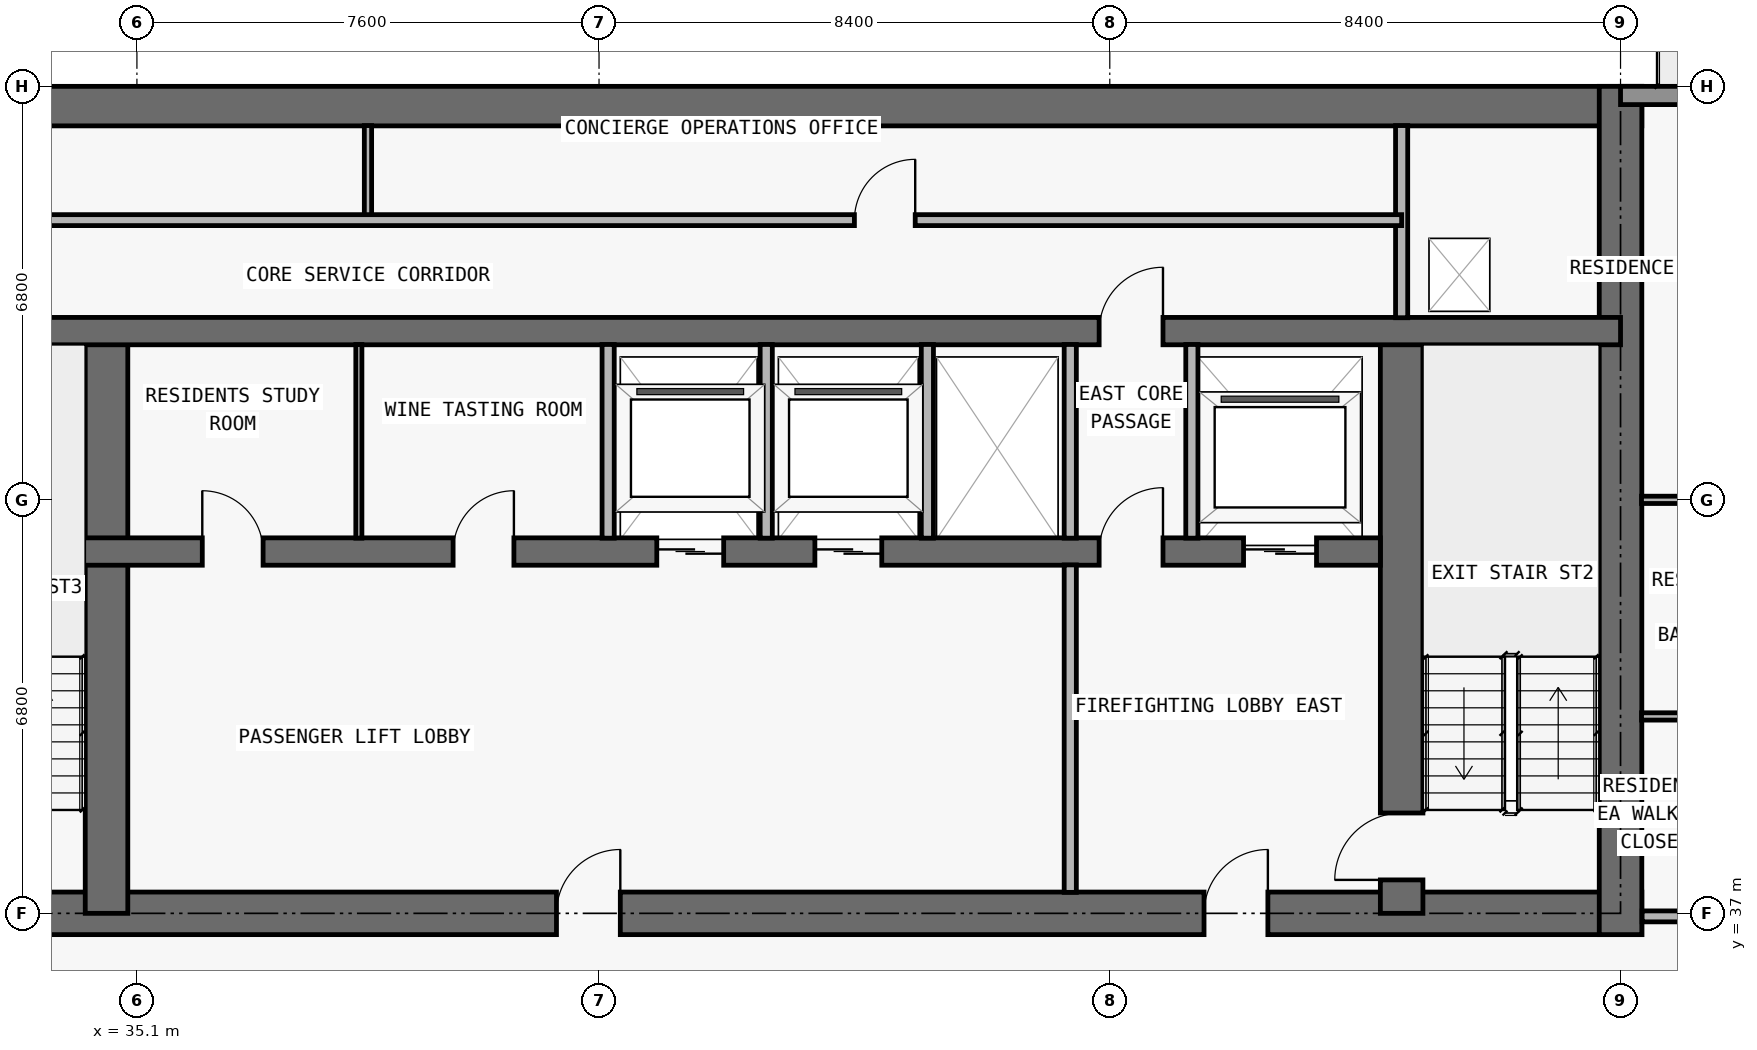
"""IFC4 building model, lengths in metres.
Left out: names, types, materials, properties, quantities, classifications, styles, units other than length and angle.
Written with IfcOpenShell. Run it as: python <this file> out.ifc"""

import sys

from ifc_helpers import new_model, si_unit, direction, frame, frame_2d, origin, place, context, subcontext, project, spatial, rectangle, extrude, element, fill, save


model = new_model("IFC4")
c1 = context("Model", 3, precision=1e-05, world=origin(), true_north=direction((0.0, 1.0)))
c2 = subcontext(c1, "Body", "Model", "MODEL_VIEW")
j1 = project(units=[si_unit("LENGTHUNIT", "METRE"), si_unit("PLANEANGLEUNIT", "RADIAN")], contexts=[c1])
p1 = place(None, origin())
s1 = spatial("IfcSite", under=j1, at=p1, CompositionType="ELEMENT")
p2 = place(p1, origin())
s2 = spatial("IfcBuilding", under=s1, at=p2, CompositionType="ELEMENT")
p3 = place(p2, frame((0.0, 0.0, 177.0)))
s3 = spatial("IfcBuildingStorey", under=s2, at=p3, CompositionType="ELEMENT", Elevation=177.0)
p4 = place(p3, frame((17.95, 37.0, 0.0), z_axis=(0.0, 0.0, 1.0), x_axis=(1.0, 0.0, 0.0)))
e1 = element("IfcWall", 1, at=p4, inside=s3, PredefinedType="SHEAR", context=c2, shape_type="SweptSolid", body=[
    extrude(rectangle(XDim=41.9, YDim=0.7, at=frame_2d((20.95, 0.0))), origin(), (0.0, 0.0, 1.0), 3.05),
])
p5 = place(p4, frame((14.35, 0.0, 0.0)))
e2 = element("IfcOpeningElement", 2, at=p5, cuts=e1, PredefinedType="OPENING", context=c2, shape_type="SweptSolid", body=[
    extrude(rectangle(XDim=1.1, YDim=2.15, at=frame_2d((0.55, 1.075))), frame((0.0, 0.36, 0.0), z_axis=(0.0, -1.0, 0.0), x_axis=(1.0, 0.0, 0.0)), (0.0, 0.0, 1.0), 0.72),
])
p6 = place(p4, frame((6.2, 0.0, 0.0)))
e3 = element("IfcOpeningElement", 3, at=p6, cuts=e1, PredefinedType="OPENING", context=c2, shape_type="SweptSolid", body=[
    extrude(rectangle(XDim=1.05, YDim=2.15, at=frame_2d((0.525, 1.075))), frame((0.0, 0.36, 0.0), z_axis=(0.0, -1.0, 0.0), x_axis=(1.0, 0.0, 0.0)), (0.0, 0.0, 1.0), 0.72),
])
p7 = place(p4, frame((34.7, 0.0, 0.0)))
e4 = element("IfcOpeningElement", 4, at=p7, cuts=e1, PredefinedType="OPENING", context=c2, shape_type="SweptSolid", body=[
    extrude(rectangle(XDim=1.05, YDim=2.15, at=frame_2d((0.525, 1.075))), frame((0.0, 0.36, 0.0), z_axis=(0.0, -1.0, 0.0), x_axis=(1.0, 0.0, 0.0)), (0.0, 0.0, 1.0), 0.72),
])
p8 = place(p4, frame((10.812, 0.0, 0.0)))
e5 = element("IfcOpeningElement", 5, at=p8, cuts=e1, PredefinedType="OPENING", context=c2, shape_type="SweptSolid", body=[
    extrude(rectangle(XDim=1.05, YDim=2.15, at=frame_2d((0.525, 1.075))), frame((0.0, 0.36, 0.0), z_axis=(0.0, -1.0, 0.0), x_axis=(1.0, 0.0, 0.0)), (0.0, 0.0, 1.0), 0.72),
])
p9 = place(p4, frame((24.05, 0.0, 0.0)))
e6 = element("IfcOpeningElement", 6, at=p9, cuts=e1, PredefinedType="OPENING", context=c2, shape_type="SweptSolid", body=[
    extrude(rectangle(XDim=1.05, YDim=2.15, at=frame_2d((0.525, 1.075))), frame((0.0, 0.36, 0.0), z_axis=(0.0, -1.0, 0.0), x_axis=(1.0, 0.0, 0.0)), (0.0, 0.0, 1.0), 0.72),
])
p10 = place(p3, frame((17.95, 50.275, 0.0), z_axis=(0.0, 0.0, 1.0), x_axis=(1.0, 0.0, 0.0)))
e7 = element("IfcWall", 7, at=p10, inside=s3, PredefinedType="SHEAR", context=c2, shape_type="SweptSolid", body=[
    extrude(rectangle(XDim=41.9, YDim=0.65, at=frame_2d((20.95, 0.0))), origin(), (0.0, 0.0, 1.0), 3.05),
])
p11 = place(p3, frame((59.5, 36.65, 0.0), z_axis=(0.0, 0.0, 1.0), x_axis=(0.0, 1.0, 0.0)))
e8 = element("IfcWall", 8, at=p11, inside=s3, PredefinedType="SHEAR", context=c2, shape_type="SweptSolid", body=[
    extrude(rectangle(XDim=13.95, YDim=0.7, at=frame_2d((6.975, 0.0))), origin(), (0.0, 0.0, 1.0), 3.05),
])
p12 = place(p3, frame((55.9, 37.0, 0.0), z_axis=(0.0, 0.0, 1.0), x_axis=(0.0, 1.0, 0.0)))
e9 = element("IfcWall", 9, at=p12, inside=s3, PredefinedType="SHEAR", context=c2, shape_type="SweptSolid", body=[
    extrude(rectangle(XDim=9.575, YDim=0.7, at=frame_2d((4.788, 0.0))), origin(), (0.0, 0.0, 1.0), 3.05),
])
p13 = place(p12, frame((0.55, 0.0, 0.0)))
e10 = element("IfcOpeningElement", 10, at=p13, cuts=e9, PredefinedType="OPENING", context=c2, shape_type="SweptSolid", body=[
    extrude(rectangle(XDim=1.1, YDim=2.15, at=frame_2d((0.55, 1.075))), frame((0.0, 0.36, 0.0), z_axis=(0.0, -1.0, 0.0), x_axis=(1.0, 0.0, 0.0)), (0.0, 0.0, 1.0), 0.72),
])
p14 = place(p3, frame((34.6, 37.0, 0.0), z_axis=(0.0, 0.0, 1.0), x_axis=(0.0, 1.0, 0.0)))
e11 = element("IfcWall", 11, at=p14, inside=s3, PredefinedType="SHEAR", context=c2, shape_type="SweptSolid", body=[
    extrude(rectangle(XDim=9.575, YDim=0.7, at=frame_2d((4.788, 0.0))), origin(), (0.0, 0.0, 1.0), 3.05),
])
p15 = place(p3, frame((22.25, 42.95, 0.0), z_axis=(0.0, 0.0, 1.0), x_axis=(1.0, 0.0, 0.0)))
e12 = element("IfcWall", 12, at=p15, inside=s3, PredefinedType="SHEAR", context=c2, shape_type="SweptSolid", body=[
    extrude(rectangle(XDim=33.3, YDim=0.45, at=frame_2d((16.65, 0.0))), origin(), (0.0, 0.0, 1.0), 3.05),
])
p16 = place(p15, frame((1.05, 0.0, 0.0)))
e13 = element("IfcOpeningElement", 13, at=p16, cuts=e12, PredefinedType="OPENING", context=c2, shape_type="SweptSolid", body=[
    extrude(rectangle(XDim=1.2, YDim=2.2, at=frame_2d((0.6, 1.1))), frame((0.0, 0.235, 0.0), z_axis=(0.0, -1.0, 0.0), x_axis=(1.0, 0.0, 0.0)), (0.0, 0.0, 1.0), 0.47),
])
p17 = place(p15, frame((31.05, 0.0, 0.0)))
e14 = element("IfcOpeningElement", 14, at=p17, cuts=e12, PredefinedType="OPENING", context=c2, shape_type="SweptSolid", body=[
    extrude(rectangle(XDim=1.2, YDim=2.2, at=frame_2d((0.6, 1.1))), frame((0.0, 0.235, 0.0), z_axis=(0.0, -1.0, 0.0), x_axis=(1.0, 0.0, 0.0)), (0.0, 0.0, 1.0), 0.47),
])
p18 = place(p15, frame((21.4, 0.0, 0.0)))
e15 = element("IfcOpeningElement", 15, at=p18, cuts=e12, PredefinedType="OPENING", context=c2, shape_type="SweptSolid", body=[
    extrude(rectangle(XDim=1.1, YDim=2.2, at=frame_2d((0.55, 1.1))), frame((0.0, 0.235, 0.0), z_axis=(0.0, -1.0, 0.0), x_axis=(1.0, 0.0, 0.0)), (0.0, 0.0, 1.0), 0.47),
])
p19 = place(p15, frame((24.0, 0.0, 0.0)))
e16 = element("IfcOpeningElement", 16, at=p19, cuts=e12, PredefinedType="OPENING", context=c2, shape_type="SweptSolid", body=[
    extrude(rectangle(XDim=1.1, YDim=2.2, at=frame_2d((0.55, 1.1))), frame((0.0, 0.235, 0.0), z_axis=(0.0, -1.0, 0.0), x_axis=(1.0, 0.0, 0.0)), (0.0, 0.0, 1.0), 0.47),
])
p20 = place(p15, frame((3.625, 0.0, 0.0)))
e17 = element("IfcOpeningElement", 17, at=p20, cuts=e12, PredefinedType="OPENING", context=c2, shape_type="SweptSolid", body=[
    extrude(rectangle(XDim=1.05, YDim=2.15, at=frame_2d((0.525, 1.075))), frame((0.0, 0.235, 0.0), z_axis=(0.0, -1.0, 0.0), x_axis=(1.0, 0.0, 0.0)), (0.0, 0.0, 1.0), 0.47),
])
p21 = place(p15, frame((28.675, 0.0, 0.0)))
e18 = element("IfcOpeningElement", 18, at=p21, cuts=e12, PredefinedType="OPENING", context=c2, shape_type="SweptSolid", body=[
    extrude(rectangle(XDim=1.05, YDim=2.15, at=frame_2d((0.525, 1.075))), frame((0.0, 0.235, 0.0), z_axis=(0.0, -1.0, 0.0), x_axis=(1.0, 0.0, 0.0)), (0.0, 0.0, 1.0), 0.47),
])
p22 = place(p15, frame((13.925, 0.0, 0.0)))
e19 = element("IfcOpeningElement", 19, at=p22, cuts=e12, PredefinedType="OPENING", context=c2, shape_type="SweptSolid", body=[
    extrude(rectangle(XDim=1.0, YDim=2.2, at=frame_2d((0.5, 1.1))), frame((0.0, 0.235, 0.0), z_axis=(0.0, -1.0, 0.0), x_axis=(1.0, 0.0, 0.0)), (0.0, 0.0, 1.0), 0.47),
])
p23 = place(p15, frame((18.05, 0.0, 0.0)))
e20 = element("IfcOpeningElement", 20, at=p23, cuts=e12, PredefinedType="OPENING", context=c2, shape_type="SweptSolid", body=[
    extrude(rectangle(XDim=1.0, YDim=2.2, at=frame_2d((0.5, 1.1))), frame((0.0, 0.235, 0.0), z_axis=(0.0, -1.0, 0.0), x_axis=(1.0, 0.0, 0.0)), (0.0, 0.0, 1.0), 0.47),
])
p24 = place(p3, frame((18.3, 46.575, 0.0), z_axis=(0.0, 0.0, 1.0), x_axis=(1.0, 0.0, 0.0)))
e21 = element("IfcWall", 21, at=p24, inside=s3, PredefinedType="SHEAR", context=c2, shape_type="SweptSolid", body=[
    extrude(rectangle(XDim=41.2, YDim=0.45, at=frame_2d((20.6, 0.0))), origin(), (0.0, 0.0, 1.0), 3.05),
])
p25 = place(p24, frame((7.575, 0.0, 0.0)))
e22 = element("IfcOpeningElement", 22, at=p25, cuts=e21, PredefinedType="OPENING", context=c2, shape_type="SweptSolid", body=[
    extrude(rectangle(XDim=1.05, YDim=2.15, at=frame_2d((0.525, 1.075))), frame((0.0, 0.235, 0.0), z_axis=(0.0, -1.0, 0.0), x_axis=(1.0, 0.0, 0.0)), (0.0, 0.0, 1.0), 0.47),
])
p26 = place(p24, frame((32.625, 0.0, 0.0)))
e23 = element("IfcOpeningElement", 23, at=p26, cuts=e21, PredefinedType="OPENING", context=c2, shape_type="SweptSolid", body=[
    extrude(rectangle(XDim=1.05, YDim=2.15, at=frame_2d((0.525, 1.075))), frame((0.0, 0.235, 0.0), z_axis=(0.0, -1.0, 0.0), x_axis=(1.0, 0.0, 0.0)), (0.0, 0.0, 1.0), 0.47),
])
p27 = place(p3, frame((59.5, 50.45, 0.0), z_axis=(0.0, 0.0, 1.0), x_axis=(1.0, 0.0, 0.0)))
e24 = element("IfcWall", 24, at=p27, inside=s3, PredefinedType="STANDARD", context=c2, shape_type="SweptSolid", body=[
    extrude(rectangle(XDim=8.2, YDim=0.3, at=frame_2d((4.1, 0.0))), origin(), (0.0, 0.0, 1.0), 3.05),
])
p28 = place(p27, frame((3.1, 0.0, 0.0)))
e25 = element("IfcOpeningElement", 25, at=p28, cuts=e24, PredefinedType="OPENING", context=c2, shape_type="SweptSolid", body=[
    extrude(rectangle(XDim=2.0, YDim=2.3, at=frame_2d((1.0, 1.15))), frame((0.0, 0.16, 0.0), z_axis=(0.0, -1.0, 0.0), x_axis=(1.0, 0.0, 0.0)), (0.0, 0.0, 1.0), 0.32),
])
p29 = place(p3, frame((38.75, 43.17, 0.0), z_axis=(0.0, 0.0, 1.0), x_axis=(0.0, 1.0, 0.0)))
e26 = element("IfcWall", 26, at=p29, inside=s3, PredefinedType="MOVABLE", context=c2, shape_type="SweptSolid", body=[
    extrude(rectangle(XDim=3.185, YDim=0.1, at=frame_2d((1.593, 0.0))), origin(), (0.0, 0.0, 1.0), 3.05),
])
p30 = place(p3, frame((38.9, 48.4, 0.0), z_axis=(0.0, 0.0, 1.0), x_axis=(0.0, 1.0, 0.0)))
e27 = element("IfcWall", 27, at=p30, inside=s3, PredefinedType="PARTITIONING", context=c2, shape_type="SweptSolid", body=[
    extrude(rectangle(XDim=1.555, YDim=0.12, at=frame_2d((0.778, 0.0))), origin(), (0.0, 0.0, 1.0), 3.05),
])
for number, where, z_axis, x_axis in (
    (28, (42.85, 43.17, 0.0), (0.0, 0.0, 1.0), (0.0, 1.0, 0.0)),
    (29, (45.45, 43.17, 0.0), (0.0, 0.0, 1.0), (0.0, 1.0, 0.0)),
    (30, (48.1, 43.17, 0.0), (0.0, 0.0, 1.0), (0.0, 1.0, 0.0)),
):
    element("IfcWall", number, at=place(p3, frame(where, z_axis=z_axis, x_axis=x_axis)), inside=s3, PredefinedType="PARTITIONING", context=c2, shape_type="SweptSolid", body=[
        extrude(rectangle(XDim=3.185, YDim=0.2, at=frame_2d((1.593, 0.0))), origin(), (0.0, 0.0, 1.0), 3.05),
    ])
p31 = place(p3, frame((50.45, 37.345, 0.0), z_axis=(0.0, 0.0, 1.0), x_axis=(0.0, 1.0, 0.0)))
e31 = element("IfcWall", 31, at=p31, inside=s3, PredefinedType="PARTITIONING", context=c2, shape_type="SweptSolid", body=[
    extrude(rectangle(XDim=5.385, YDim=0.2, at=frame_2d((2.692, 0.0))), origin(), (0.0, 0.0, 1.0), 3.05),
])
for number, where, z_axis, x_axis in (
    (32, (50.45, 43.17, 0.0), (0.0, 0.0, 1.0), (0.0, 1.0, 0.0)),
    (33, (52.45, 43.17, 0.0), (0.0, 0.0, 1.0), (0.0, 1.0, 0.0)),
):
    element("IfcWall", number, at=place(p3, frame(where, z_axis=z_axis, x_axis=x_axis)), inside=s3, PredefinedType="PARTITIONING", context=c2, shape_type="SweptSolid", body=[
        extrude(rectangle(XDim=3.185, YDim=0.2, at=frame_2d((1.593, 0.0))), origin(), (0.0, 0.0, 1.0), 3.05),
    ])
p32 = place(p3, frame((55.9, 46.795, 0.0), z_axis=(0.0, 0.0, 1.0), x_axis=(0.0, 1.0, 0.0)))
e34 = element("IfcWall", 34, at=p32, inside=s3, PredefinedType="PARTITIONING", context=c2, shape_type="SweptSolid", body=[
    extrude(rectangle(XDim=3.16, YDim=0.2, at=frame_2d((1.58, 0.0))), origin(), (0.0, 0.0, 1.0), 3.05),
])
p33 = place(p3, frame((59.855, 36.95, 0.0), z_axis=(0.0, 0.0, 1.0), x_axis=(1.0, 0.0, 0.0)))
e35 = element("IfcWall", 35, at=p33, inside=s3, PredefinedType="PARTITIONING", context=c2, shape_type="SweptSolid", body=[
    extrude(rectangle(XDim=5.425, YDim=0.18, at=frame_2d((2.712, 0.0))), origin(), (0.0, 0.0, 1.0), 3.05),
])
p34 = place(p33, frame((3.385, 0.0, 0.0)))
e36 = element("IfcOpeningElement", 36, at=p34, cuts=e35, PredefinedType="OPENING", context=c2, shape_type="SweptSolid", body=[
    extrude(rectangle(XDim=1.0, YDim=2.2, at=frame_2d((0.5, 1.1))), frame((0.0, 0.1, 0.0), z_axis=(0.0, -1.0, 0.0), x_axis=(1.0, 0.0, 0.0)), (0.0, 0.0, 1.0), 0.2),
])
p35 = place(p3, frame((59.845, 40.238, 0.0), z_axis=(0.0, 0.0, 1.0), x_axis=(1.0, 0.0, 0.0)))
e37 = element("IfcWall", 37, at=p35, inside=s3, PredefinedType="PARTITIONING", context=c2, shape_type="SweptSolid", body=[
    extrude(rectangle(XDim=2.355, YDim=0.12, at=frame_2d((1.177, 0.0))), origin(), (0.0, 0.0, 1.0), 3.05),
])
p36 = place(p3, frame((59.845, 43.8, 0.0), z_axis=(0.0, 0.0, 1.0), x_axis=(1.0, 0.0, 0.0)))
e38 = element("IfcWall", 38, at=p36, inside=s3, PredefinedType="PARTITIONING", context=c2, shape_type="SweptSolid", body=[
    extrude(rectangle(XDim=5.435, YDim=0.12, at=frame_2d((2.718, 0.0))), origin(), (0.0, 0.0, 1.0), 2.418),
])
p37 = place(p36, frame((3.445, 0.0, 0.0)))
e39 = element("IfcOpeningElement", 39, at=p37, cuts=e38, PredefinedType="OPENING", context=c2, shape_type="SweptSolid", body=[
    extrude(rectangle(XDim=0.9, YDim=2.15, at=frame_2d((0.45, 1.075))), frame((0.0, 0.07, 0.0), z_axis=(0.0, -1.0, 0.0), x_axis=(1.0, 0.0, 0.0)), (0.0, 0.0, 1.0), 0.14),
])
p38 = place(p36, frame((0.752, 0.0, 0.0)))
e40 = element("IfcOpeningElement", 40, at=p38, cuts=e38, PredefinedType="OPENING", context=c2, shape_type="SweptSolid", body=[
    extrude(rectangle(XDim=0.85, YDim=2.1, at=frame_2d((0.425, 1.05))), frame((0.0, 0.07, 0.0), z_axis=(0.0, -1.0, 0.0), x_axis=(1.0, 0.0, 0.0)), (0.0, 0.0, 1.0), 0.14),
])
p39 = place(p3, frame((21.9, 48.4, 0.0), z_axis=(0.0, 0.0, 1.0), x_axis=(1.0, 0.0, 0.0)))
e41 = element("IfcWall", 41, at=p39, inside=s3, PredefinedType="PARTITIONING", context=c2, shape_type="SweptSolid", body=[
    extrude(rectangle(XDim=34.0, YDim=0.18, at=frame_2d((17.0, 0.0))), origin(), (0.0, 0.0, 1.0), 3.05),
])
p40 = place(p39, frame((8.0, 0.0, 0.0)))
e42 = element("IfcOpeningElement", 42, at=p40, cuts=e41, PredefinedType="OPENING", context=c2, shape_type="SweptSolid", body=[
    extrude(rectangle(XDim=1.0, YDim=2.2, at=frame_2d((0.5, 1.1))), frame((0.0, 0.1, 0.0), z_axis=(0.0, -1.0, 0.0), x_axis=(1.0, 0.0, 0.0)), (0.0, 0.0, 1.0), 0.2),
])
p41 = place(p39, frame((25.0, 0.0, 0.0)))
e43 = element("IfcOpeningElement", 43, at=p41, cuts=e41, PredefinedType="OPENING", context=c2, shape_type="SweptSolid", body=[
    extrude(rectangle(XDim=1.0, YDim=2.2, at=frame_2d((0.5, 1.1))), frame((0.0, 0.1, 0.0), z_axis=(0.0, -1.0, 0.0), x_axis=(1.0, 0.0, 0.0)), (0.0, 0.0, 1.0), 0.2),
])
p42 = place(p17, origin())
e44 = element("IfcDoor", 44, at=p42, inside=s3, OperationType="DOUBLE_DOOR_SLIDING", PredefinedType="DOOR", context=c2, shape_type="SweptSolid", body=[
    extrude(rectangle(XDim=1.2, YDim=2.2, at=frame_2d((0.6, 1.1))), frame((0.0, 0.025, 0.0), z_axis=(0.0, -1.0, 0.0), x_axis=(1.0, 0.0, 0.0)), (0.0, 0.0, 1.0), 0.05),
])
fill(e14, e44)
p43 = place(p18, origin())
e45 = element("IfcDoor", 45, at=p43, inside=s3, OperationType="DOUBLE_DOOR_SLIDING", PredefinedType="DOOR", context=c2, shape_type="SweptSolid", body=[
    extrude(rectangle(XDim=1.1, YDim=2.2, at=frame_2d((0.55, 1.1))), frame((0.0, 0.025, 0.0), z_axis=(0.0, -1.0, 0.0), x_axis=(1.0, 0.0, 0.0)), (0.0, 0.0, 1.0), 0.05),
])
fill(e15, e45)
p44 = place(p19, origin())
e46 = element("IfcDoor", 46, at=p44, inside=s3, OperationType="DOUBLE_DOOR_SLIDING", PredefinedType="DOOR", context=c2, shape_type="SweptSolid", body=[
    extrude(rectangle(XDim=1.1, YDim=2.2, at=frame_2d((0.55, 1.1))), frame((0.0, 0.025, 0.0), z_axis=(0.0, -1.0, 0.0), x_axis=(1.0, 0.0, 0.0)), (0.0, 0.0, 1.0), 0.05),
])
fill(e16, e46)
p45 = place(p7, origin())
e47 = element("IfcDoor", 47, at=p45, inside=s3, OperationType="SINGLE_SWING_RIGHT", PredefinedType="DOOR", context=c2, shape_type="SweptSolid", body=[
    extrude(rectangle(XDim=1.05, YDim=2.15, at=frame_2d((0.525, 1.075))), frame((0.0, 0.025, 0.0), z_axis=(0.0, -1.0, 0.0), x_axis=(1.0, 0.0, 0.0)), (0.0, 0.0, 1.0), 0.05),
])
fill(e4, e47)
p46 = place(p13, origin())
e48 = element("IfcDoor", 48, at=p46, inside=s3, OperationType="SINGLE_SWING_LEFT", PredefinedType="DOOR", context=c2, shape_type="SweptSolid", body=[
    extrude(rectangle(XDim=1.1, YDim=2.15, at=frame_2d((0.55, 1.075))), frame((0.0, 0.025, 0.0), z_axis=(0.0, -1.0, 0.0), x_axis=(1.0, 0.0, 0.0)), (0.0, 0.0, 1.0), 0.05),
])
fill(e10, e48)
p47 = place(p21, origin())
e49 = element("IfcDoor", 49, at=p47, inside=s3, OperationType="SINGLE_SWING_RIGHT", PredefinedType="DOOR", context=c2, shape_type="SweptSolid", body=[
    extrude(rectangle(XDim=1.05, YDim=2.15, at=frame_2d((0.525, 1.075))), frame((0.0, 0.025, 0.0), z_axis=(0.0, -1.0, 0.0), x_axis=(1.0, 0.0, 0.0)), (0.0, 0.0, 1.0), 0.05),
])
fill(e18, e49)
p48 = place(p9, origin())
e50 = element("IfcDoor", 50, at=p48, inside=s3, OperationType="SINGLE_SWING_RIGHT", PredefinedType="DOOR", context=c2, shape_type="SweptSolid", body=[
    extrude(rectangle(XDim=1.05, YDim=2.15, at=frame_2d((0.525, 1.075))), frame((0.0, 0.025, 0.0), z_axis=(0.0, -1.0, 0.0), x_axis=(1.0, 0.0, 0.0)), (0.0, 0.0, 1.0), 0.05),
])
fill(e6, e50)
p49 = place(p22, origin())
e51 = element("IfcDoor", 51, at=p49, inside=s3, OperationType="SINGLE_SWING_LEFT", PredefinedType="DOOR", context=c2, shape_type="SweptSolid", body=[
    extrude(rectangle(XDim=1.0, YDim=2.2, at=frame_2d((0.5, 1.1))), frame((0.0, 0.025, 0.0), z_axis=(0.0, -1.0, 0.0), x_axis=(1.0, 0.0, 0.0)), (0.0, 0.0, 1.0), 0.05),
])
fill(e19, e51)
p50 = place(p23, origin())
e52 = element("IfcDoor", 52, at=p50, inside=s3, OperationType="SINGLE_SWING_RIGHT", PredefinedType="DOOR", context=c2, shape_type="SweptSolid", body=[
    extrude(rectangle(XDim=1.0, YDim=2.2, at=frame_2d((0.5, 1.1))), frame((0.0, 0.025, 0.0), z_axis=(0.0, -1.0, 0.0), x_axis=(1.0, 0.0, 0.0)), (0.0, 0.0, 1.0), 0.05),
])
fill(e20, e52)
p51 = place(p26, origin())
e53 = element("IfcDoor", 53, at=p51, inside=s3, OperationType="SINGLE_SWING_RIGHT", PredefinedType="DOOR", context=c2, shape_type="SweptSolid", body=[
    extrude(rectangle(XDim=1.05, YDim=2.15, at=frame_2d((0.525, 1.075))), frame((0.0, 0.025, 0.0), z_axis=(0.0, -1.0, 0.0), x_axis=(1.0, 0.0, 0.0)), (0.0, 0.0, 1.0), 0.05),
])
fill(e23, e53)
p52 = place(p41, origin())
e54 = element("IfcDoor", 54, at=p52, inside=s3, OperationType="SINGLE_SWING_RIGHT", PredefinedType="DOOR", context=c2, shape_type="SweptSolid", body=[
    extrude(rectangle(XDim=1.0, YDim=2.2, at=frame_2d((0.5, 1.1))), frame((0.0, 0.025, 0.0), z_axis=(0.0, -1.0, 0.0), x_axis=(1.0, 0.0, 0.0)), (0.0, 0.0, 1.0), 0.05),
])
fill(e43, e54)
save(model, sys.argv[1])
